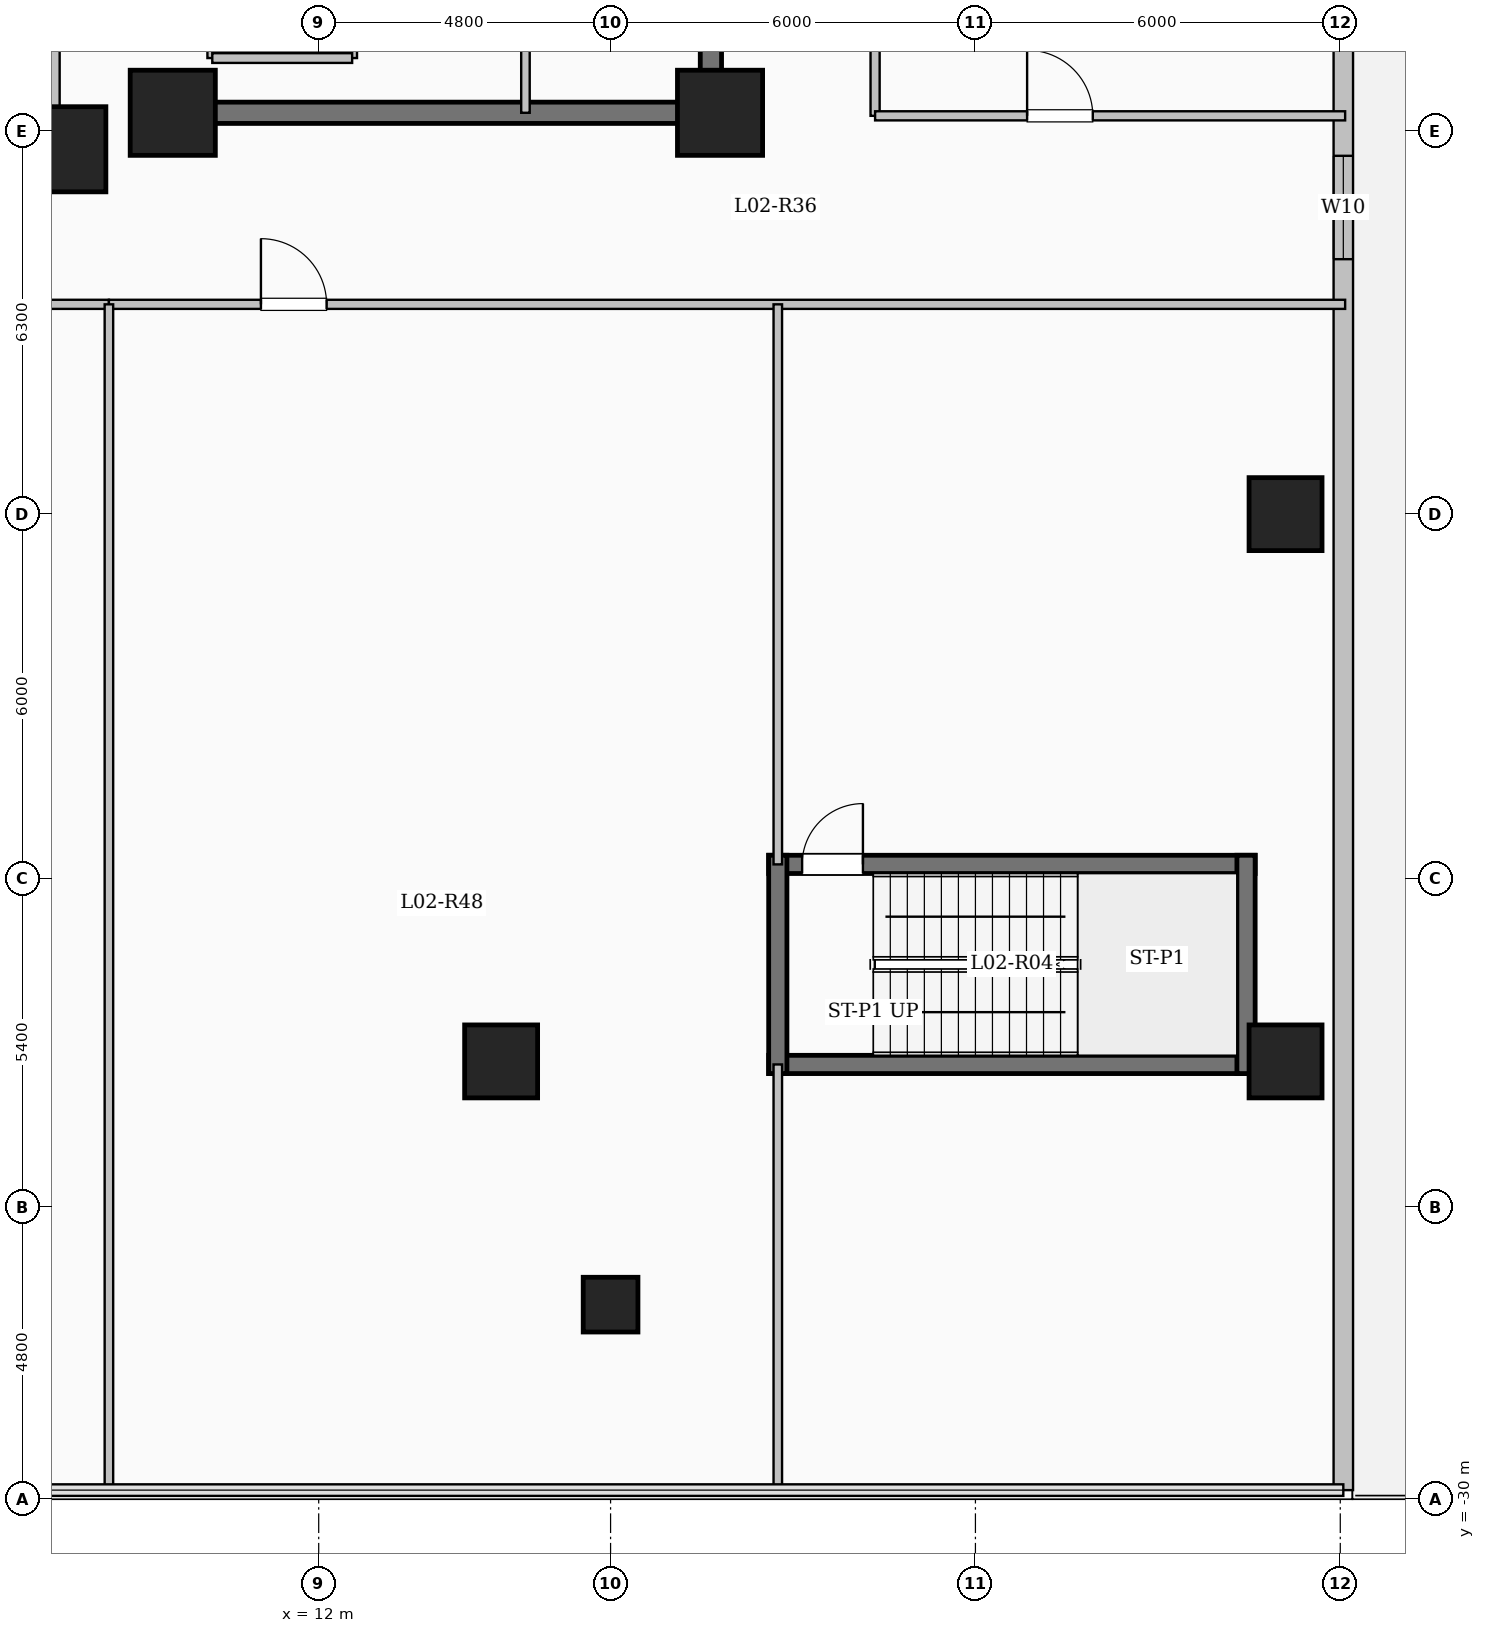
"""IFC4 building model, lengths in metres.
Left out: names, types, materials, properties, quantities, classifications, styles, units other than length and angle.
Written with IfcOpenShell. Run it as: python <this file> out.ifc"""

import sys

from ifc_helpers import new_model, si_unit, direction, frame, frame_2d, origin, origin_2d, place, context, subcontext, project, spatial, rectangle, extrude, element, fill, save


model = new_model("IFC4")
c1 = context("Model", 3, precision=1e-05, world=origin(), true_north=direction((0.0, 1.0)))
c2 = subcontext(c1, "Body", "Model", "MODEL_VIEW")
j1 = project(units=[si_unit("LENGTHUNIT", "METRE"), si_unit("PLANEANGLEUNIT", "RADIAN")], contexts=[c1])
p1 = place(None, origin())
s1 = spatial("IfcSite", under=j1, at=p1, CompositionType="ELEMENT")
p2 = place(p1, origin())
s2 = spatial("IfcBuilding", under=s1, at=p2, CompositionType="ELEMENT")
p3 = place(p2, frame((0.0, 0.0, 9.9)))
s3 = spatial("IfcBuildingStorey", under=s2, at=p3, CompositionType="ELEMENT", Elevation=9.9)
for number, where, z_axis, x_axis in (
    (1, (7.8, -7.8, 0.0), (0.0, 0.0, 1.0), (1.0, 0.0, 0.0)),
    (2, (9.6, -7.2, 0.0), (0.0, 0.0, 1.0), (1.0, 0.0, 0.0)),
    (3, (18.6, -7.2, 0.0), (0.0, 0.0, 1.0), (1.0, 0.0, 0.0)),
):
    element("IfcColumn", number, at=place(p3, frame(where, z_axis=z_axis, x_axis=x_axis)), inside=s3, PredefinedType="COLUMN", context=c2, shape_type="SweptSolid", body=[
        extrude(rectangle(XDim=1.4, YDim=1.4, at=origin_2d()), origin(), (0.0, 0.0, 1.0), 4.5),
    ])
p4 = place(p3, frame((16.8, -26.8, 0.0), z_axis=(0.0, 0.0, 1.0), x_axis=(1.0, 0.0, 0.0)))
e4 = element("IfcColumn", 4, at=p4, inside=s3, PredefinedType="COLUMN", context=c2, shape_type="SweptSolid", body=[
    extrude(rectangle(XDim=0.9, YDim=0.9, at=origin_2d()), origin(), (0.0, 0.0, 1.0), 4.28),
])
for number, where, z_axis, x_axis in (
    (5, (15.0, -22.8, 0.0), (0.0, 0.0, 1.0), (1.0, 0.0, 0.0)),
    (6, (27.9, -22.8, 0.0), (0.0, 0.0, 1.0), (1.0, 0.0, 0.0)),
    (7, (27.9, -13.8, 0.0), (0.0, 0.0, 1.0), (1.0, 0.0, 0.0)),
):
    element("IfcColumn", number, at=place(p3, frame(where, z_axis=z_axis, x_axis=x_axis)), inside=s3, PredefinedType="COLUMN", context=c2, shape_type="SweptSolid", body=[
        extrude(rectangle(XDim=1.2, YDim=1.2, at=origin_2d()), origin(), (0.0, 0.0, 1.0), 4.5),
    ])
p5 = place(p3, frame((7.62, -7.62, 0.0), z_axis=(0.0, 0.0, 1.0), x_axis=(0.0, 1.0, 0.0)))
e8 = element("IfcWall", 8, at=p5, inside=s3, PredefinedType="SOLIDWALL", context=c2, shape_type="SweptSolid", body=[
    extrude(rectangle(XDim=15.24, YDim=0.24, at=frame_2d((7.62, 0.0))), origin(), (0.0, 0.0, 1.0), 4.2),
])
p6 = place(p5, frame((6.92, 0.0, 0.95)))
e9 = element("IfcOpeningElement", 9, at=p6, cuts=e8, PredefinedType="OPENING", context=c2, shape_type="SweptSolid", body=[
    extrude(rectangle(XDim=1.4, YDim=1.5, at=frame_2d((0.7, 0.75))), frame((0.0, 0.13, 0.0), z_axis=(0.0, -1.0, 0.0), x_axis=(1.0, 0.0, 0.0)), (0.0, 0.0, 1.0), 0.26),
])
p7 = place(p3, frame((28.85, 29.85, 0.0), z_axis=(0.0, 0.0, 1.0), x_axis=(0.0, -1.0, 0.0)))
e10 = element("IfcWall", 10, at=p7, inside=s3, PredefinedType="SOLIDWALL", context=c2, shape_type="SweptSolid", body=[
    extrude(rectangle(XDim=59.7, YDim=0.32, at=frame_2d((29.85, 0.0))), origin(), (0.0, 0.0, 1.0), 4.2),
])
p8 = place(p7, frame((20.75, 0.0, 0.0)))
e11 = element("IfcOpeningElement", 11, at=p8, cuts=e10, PredefinedType="OPENING", context=c2, shape_type="SweptSolid", body=[
    extrude(rectangle(XDim=1.25, YDim=2.25, at=frame_2d((0.625, 1.125))), frame((0.0, 0.17, 0.0), z_axis=(0.0, -1.0, 0.0), x_axis=(1.0, 0.0, 0.0)), (0.0, 0.0, 1.0), 0.34),
])
p9 = place(p7, frame((7.6, 0.0, 0.9)))
e12 = element("IfcOpeningElement", 12, at=p9, cuts=e10, PredefinedType="OPENING", context=c2, shape_type="SweptSolid", body=[
    extrude(rectangle(XDim=2.1, YDim=2.0, at=frame_2d((1.05, 1.0))), frame((0.0, 0.17, 0.0), z_axis=(0.0, -1.0, 0.0), x_axis=(1.0, 0.0, 0.0)), (0.0, 0.0, 1.0), 0.34),
])
p10 = place(p7, frame((17.725, 0.0, 0.95)))
e13 = element("IfcOpeningElement", 13, at=p10, cuts=e10, PredefinedType="OPENING", context=c2, shape_type="SweptSolid", body=[
    extrude(rectangle(XDim=1.0, YDim=1.5, at=frame_2d((0.5, 0.75))), frame((0.0, 0.17, 0.0), z_axis=(0.0, -1.0, 0.0), x_axis=(1.0, 0.0, 0.0)), (0.0, 0.0, 1.0), 0.34),
])
p11 = place(p7, frame((28.345, 0.0, 0.9)))
e14 = element("IfcOpeningElement", 14, at=p11, cuts=e10, PredefinedType="OPENING", context=c2, shape_type="SweptSolid", body=[
    extrude(rectangle(XDim=2.1, YDim=2.0, at=frame_2d((1.05, 1.0))), frame((0.0, 0.17, 0.0), z_axis=(0.0, -1.0, 0.0), x_axis=(1.0, 0.0, 0.0)), (0.0, 0.0, 1.0), 0.34),
])
p12 = place(p7, frame((37.758, 0.0, 0.9)))
e15 = element("IfcOpeningElement", 15, at=p12, cuts=e10, PredefinedType="OPENING", context=c2, shape_type="SweptSolid", body=[
    extrude(rectangle(XDim=1.7, YDim=1.9, at=frame_2d((0.85, 0.95))), frame((0.0, 0.17, 0.0), z_axis=(0.0, -1.0, 0.0), x_axis=(1.0, 0.0, 0.0)), (0.0, 0.0, 1.0), 0.34),
])
p13 = place(p3, frame((19.4, -19.56, 0.0), z_axis=(0.0, 0.0, 1.0), x_axis=(1.0, 0.0, 0.0)))
e16 = element("IfcWall", 16, at=p13, inside=s3, PredefinedType="SHEAR", context=c2, shape_type="SweptSolid", body=[
    extrude(rectangle(XDim=8.0, YDim=0.3, at=frame_2d((4.0, 0.0))), origin(), (0.0, 0.0, 1.0), 4.5),
])
p14 = place(p13, frame((0.55, 0.0, 0.0)))
e17 = element("IfcOpeningElement", 17, at=p14, cuts=e16, PredefinedType="OPENING", context=c2, shape_type="SweptSolid", body=[
    extrude(rectangle(XDim=1.0, YDim=2.15, at=frame_2d((0.5, 1.075))), frame((0.0, 0.16, 0.0), z_axis=(0.0, -1.0, 0.0), x_axis=(1.0, 0.0, 0.0)), (0.0, 0.0, 1.0), 0.32),
])
p15 = place(p3, frame((19.4, -22.85, 0.0), z_axis=(0.0, 0.0, 1.0), x_axis=(1.0, 0.0, 0.0)))
e18 = element("IfcWall", 18, at=p15, inside=s3, PredefinedType="SHEAR", context=c2, shape_type="SweptSolid", body=[
    extrude(rectangle(XDim=8.0, YDim=0.3, at=frame_2d((4.0, 0.0))), origin(), (0.0, 0.0, 1.0), 4.5),
])
for number, where, z_axis, x_axis in (
    (19, (19.55, -23.0, 0.0), (0.0, 0.0, 1.0), (0.0, 1.0, 0.0)),
    (20, (27.25, -23.0, 0.0), (0.0, 0.0, 1.0), (0.0, 1.0, 0.0)),
):
    element("IfcWall", number, at=place(p3, frame(where, z_axis=z_axis, x_axis=x_axis)), inside=s3, PredefinedType="SHEAR", context=c2, shape_type="SweptSolid", body=[
        extrude(rectangle(XDim=3.59, YDim=0.3, at=frame_2d((1.795, 0.0))), origin(), (0.0, 0.0, 1.0), 4.5),
    ])
for number, where, z_axis, x_axis in (
    (21, (10.25, -6.3, 0.0), (0.0, 0.0, 1.0), (0.0, 1.0, 0.0)),
    (22, (12.55, -6.3, 0.0), (0.0, 0.0, 1.0), (0.0, 1.0, 0.0)),
):
    element("IfcWall", number, at=place(p3, frame(where, z_axis=z_axis, x_axis=x_axis)), inside=s3, PredefinedType="SOLIDWALL", context=c2, shape_type="SweptSolid", body=[
        extrude(rectangle(XDim=2.6, YDim=0.16, at=frame_2d((1.3, 0.0))), origin(), (0.0, 0.0, 1.0), 4.2),
    ])
p16 = place(p3, frame((10.25, -6.3, 0.0), z_axis=(0.0, 0.0, 1.0), x_axis=(1.0, 0.0, 0.0)))
e23 = element("IfcWall", 23, at=p16, inside=s3, PredefinedType="SOLIDWALL", context=c2, shape_type="SweptSolid", body=[
    extrude(rectangle(XDim=2.3, YDim=0.16, at=frame_2d((1.15, 0.0))), origin(), (0.0, 0.0, 1.0), 4.2),
])
p17 = place(p3, frame((18.45, -7.375, 0.0), z_axis=(0.0, 0.0, 1.0), x_axis=(0.0, 1.0, 0.0)))
e24 = element("IfcWall", 24, at=p17, inside=s3, PredefinedType="SHEAR", context=c2, shape_type="SweptSolid", body=[
    extrude(rectangle(XDim=14.05, YDim=0.35, at=frame_2d((7.025, 0.0))), origin(), (0.0, 0.0, 1.0), 4.5),
])
p18 = place(p3, frame((10.075, -7.2, 0.0), z_axis=(0.0, 0.0, 1.0), x_axis=(1.0, 0.0, 0.0)))
e25 = element("IfcWall", 25, at=p18, inside=s3, PredefinedType="SHEAR", context=c2, shape_type="SweptSolid", body=[
    extrude(rectangle(XDim=8.55, YDim=0.35, at=frame_2d((4.275, 0.0))), origin(), (0.0, 0.0, 1.0), 4.5),
])
p19 = place(p3, frame((15.4, -7.2, 0.0), z_axis=(0.0, 0.0, 1.0), x_axis=(0.0, 1.0, 0.0)))
e26 = element("IfcWall", 26, at=p19, inside=s3, PredefinedType="PARTITIONING", context=c2, shape_type="SweptSolid", body=[
    extrude(rectangle(XDim=10.45, YDim=0.14, at=frame_2d((5.225, 0.0))), origin(), (0.0, 0.0, 1.0), 4.2),
])
p20 = place(p19, frame((9.25, 0.0, 0.0)))
e27 = element("IfcOpeningElement", 27, at=p20, cuts=e26, PredefinedType="OPENING", context=c2, shape_type="SweptSolid", body=[
    extrude(rectangle(XDim=0.9, YDim=2.08, at=frame_2d((0.45, 1.04))), frame((0.0, 0.08, 0.0), z_axis=(0.0, -1.0, 0.0), x_axis=(1.0, 0.0, 0.0)), (0.0, 0.0, 1.0), 0.16),
])
p21 = place(p3, frame((21.15, -7.25, 0.0), z_axis=(0.0, 0.0, 1.0), x_axis=(0.0, 1.0, 0.0)))
e28 = element("IfcWall", 28, at=p21, inside=s3, PredefinedType="PARTITIONING", context=c2, shape_type="SweptSolid", body=[
    extrude(rectangle(XDim=18.0, YDim=0.15, at=frame_2d((9.0, 0.0))), origin(), (0.0, 0.0, 1.0), 4.2),
])
p22 = place(p3, frame((-8.55, -10.35, 0.0), z_axis=(0.0, 0.0, 1.0), x_axis=(1.0, 0.0, 0.0)))
e29 = element("IfcWall", 29, at=p22, inside=s3, PredefinedType="PARTITIONING", context=c2, shape_type="SweptSolid", body=[
    extrude(rectangle(XDim=17.1, YDim=0.15, at=frame_2d((8.55, 0.0))), origin(), (0.0, 0.0, 1.0), 4.2),
])
p23 = place(p22, frame((3.5, 0.0, 0.0)))
e30 = element("IfcOpeningElement", 30, at=p23, cuts=e29, PredefinedType="OPENING", context=c2, shape_type="SweptSolid", body=[
    extrude(rectangle(XDim=1.2, YDim=2.15, at=frame_2d((0.6, 1.075))), frame((0.0, 0.085, 0.0), z_axis=(0.0, -1.0, 0.0), x_axis=(1.0, 0.0, 0.0)), (0.0, 0.0, 1.0), 0.17),
])
p24 = place(p3, frame((8.55, -10.35, 0.0), z_axis=(0.0, 0.0, 1.0), x_axis=(1.0, 0.0, 0.0)))
e31 = element("IfcWall", 31, at=p24, inside=s3, PredefinedType="PARTITIONING", context=c2, shape_type="SweptSolid", body=[
    extrude(rectangle(XDim=20.33, YDim=0.15, at=frame_2d((10.165, 0.0))), origin(), (0.0, 0.0, 1.0), 4.2),
])
p25 = place(p24, frame((2.5, 0.0, 0.0)))
e32 = element("IfcOpeningElement", 32, at=p25, cuts=e31, PredefinedType="OPENING", context=c2, shape_type="SweptSolid", body=[
    extrude(rectangle(XDim=1.08, YDim=2.15, at=frame_2d((0.54, 1.075))), frame((0.0, 0.085, 0.0), z_axis=(0.0, -1.0, 0.0), x_axis=(1.0, 0.0, 0.0)), (0.0, 0.0, 1.0), 0.17),
])
p26 = place(p3, frame((8.55, -29.88, 0.0), z_axis=(0.0, 0.0, 1.0), x_axis=(0.0, 1.0, 0.0)))
e33 = element("IfcWall", 33, at=p26, inside=s3, PredefinedType="PARTITIONING", context=c2, shape_type="SweptSolid", body=[
    extrude(rectangle(XDim=19.53, YDim=0.14, at=frame_2d((9.765, 0.0))), origin(), (0.0, 0.0, 1.0), 4.2),
])
p27 = place(p3, frame((19.55, -29.88, 0.0), z_axis=(0.0, 0.0, 1.0), x_axis=(0.0, 1.0, 0.0)))
e34 = element("IfcWall", 34, at=p27, inside=s3, PredefinedType="PARTITIONING", context=c2, shape_type="SweptSolid", body=[
    extrude(rectangle(XDim=7.03, YDim=0.14, at=frame_2d((3.515, 0.0))), origin(), (0.0, 0.0, 1.0), 4.2),
])
p28 = place(p3, frame((19.55, -19.56, 0.0), z_axis=(0.0, 0.0, 1.0), x_axis=(0.0, 1.0, 0.0)))
e35 = element("IfcWall", 35, at=p28, inside=s3, PredefinedType="PARTITIONING", context=c2, shape_type="SweptSolid", body=[
    extrude(rectangle(XDim=9.21, YDim=0.14, at=frame_2d((4.605, 0.0))), origin(), (0.0, 0.0, 1.0), 4.2),
])
p29 = place(p3, frame((21.15, -7.25, 0.0), z_axis=(0.0, 0.0, 1.0), x_axis=(1.0, 0.0, 0.0)))
e36 = element("IfcWall", 36, at=p29, inside=s3, PredefinedType="PARTITIONING", context=c2, shape_type="SweptSolid", body=[
    extrude(rectangle(XDim=7.73, YDim=0.15, at=frame_2d((3.865, 0.0))), origin(), (0.0, 0.0, 1.0), 4.2),
])
p30 = place(p29, frame((2.5, 0.0, 0.0)))
e37 = element("IfcOpeningElement", 37, at=p30, cuts=e36, PredefinedType="OPENING", context=c2, shape_type="SweptSolid", body=[
    extrude(rectangle(XDim=1.08, YDim=2.15, at=frame_2d((0.54, 1.075))), frame((0.0, 0.085, 0.0), z_axis=(0.0, -1.0, 0.0), x_axis=(1.0, 0.0, 0.0)), (0.0, 0.0, 1.0), 0.17),
])
p31 = place(p12, origin())
e38 = element("IfcWindow", 38, at=p31, inside=s3, PartitioningType="SINGLE_PANEL", PredefinedType="WINDOW", context=c2, shape_type="SweptSolid", body=[
    extrude(rectangle(XDim=1.7, YDim=1.9, at=frame_2d((0.85, 0.95))), frame((0.0, 0.03, 0.0), z_axis=(0.0, -1.0, 0.0), x_axis=(1.0, 0.0, 0.0)), (0.0, 0.0, 1.0), 0.06),
])
fill(e15, e38)
p32 = place(p14, origin())
e39 = element("IfcDoor", 39, at=p32, inside=s3, OperationType="SINGLE_SWING_RIGHT", PredefinedType="DOOR", context=c2, shape_type="SweptSolid", body=[
    extrude(rectangle(XDim=1.0, YDim=2.15, at=frame_2d((0.5, 1.075))), frame((0.0, 0.025, 0.0), z_axis=(0.0, -1.0, 0.0), x_axis=(1.0, 0.0, 0.0)), (0.0, 0.0, 1.0), 0.05),
])
fill(e17, e39)
p33 = place(p25, origin())
e40 = element("IfcDoor", 40, at=p33, inside=s3, OperationType="SINGLE_SWING_LEFT", PredefinedType="DOOR", context=c2, shape_type="SweptSolid", body=[
    extrude(rectangle(XDim=1.08, YDim=2.15, at=frame_2d((0.54, 1.075))), frame((0.0, 0.025, 0.0), z_axis=(0.0, -1.0, 0.0), x_axis=(1.0, 0.0, 0.0)), (0.0, 0.0, 1.0), 0.05),
])
fill(e32, e40)
p34 = place(p30, origin())
e41 = element("IfcDoor", 41, at=p34, inside=s3, OperationType="SINGLE_SWING_LEFT", PredefinedType="DOOR", context=c2, shape_type="SweptSolid", body=[
    extrude(rectangle(XDim=1.08, YDim=2.15, at=frame_2d((0.54, 1.075))), frame((0.0, 0.025, 0.0), z_axis=(0.0, -1.0, 0.0), x_axis=(1.0, 0.0, 0.0)), (0.0, 0.0, 1.0), 0.05),
])
fill(e37, e41)
save(model, sys.argv[1])
